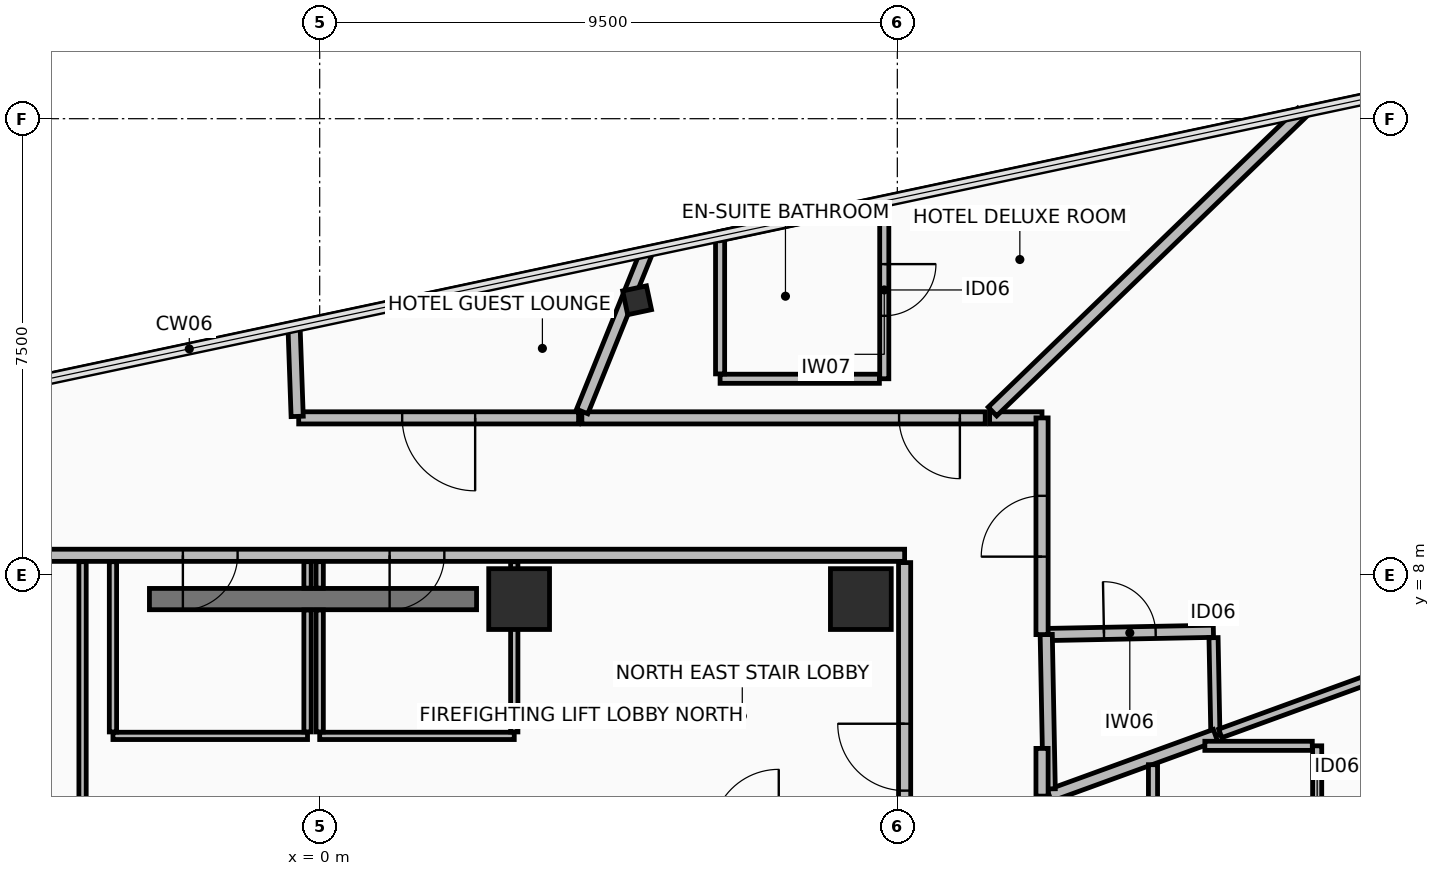
"""IFC4 building model, lengths in metres.
Left out: names, types, materials, properties, quantities, classifications, styles, units other than length and angle.
Written with IfcOpenShell. Run it as: python <this file> out.ifc"""

import sys

from ifc_helpers import new_model, si_unit, direction, frame, frame_2d, origin, origin_2d, place, context, subcontext, project, spatial, rectangle, hollow_rectangle, extrude, element, fill, save


model = new_model("IFC4")
c1 = context("Model", 3, precision=1e-05, world=origin(), true_north=direction((0.0, 1.0)))
c2 = subcontext(c1, "Body", "Model", "MODEL_VIEW")
j1 = project(units=[si_unit("LENGTHUNIT", "METRE"), si_unit("PLANEANGLEUNIT", "RADIAN")], contexts=[c1])
p1 = place(None, origin())
s1 = spatial("IfcSite", under=j1, at=p1, CompositionType="ELEMENT")
p2 = place(p1, origin())
s2 = spatial("IfcBuilding", under=s1, at=p2, CompositionType="ELEMENT")
p3 = place(p2, frame((0.0, 0.0, 294.35)))
s3 = spatial("IfcBuildingStorey", under=s2, at=p3, CompositionType="ELEMENT", Elevation=294.35)
for number, where, z_axis, x_axis in (
    (1, (8.9, 7.6, 0.0), (0.0, 0.0, 1.0), (1.0, 0.0, 0.0)),
    (2, (3.28, 7.6, 0.0), (0.0, 0.0, 1.0), (1.0, 0.0, 0.0)),
):
    element("IfcColumn", number, at=place(p3, frame(where, z_axis=z_axis, x_axis=x_axis)), inside=s3, PredefinedType="COLUMN", context=c2, shape_type="SweptSolid", body=[
        extrude(rectangle(XDim=1.0, YDim=1.0, at=origin_2d()), origin(), (0.0, 0.0, 1.0), 3.65),
    ])
p4 = place(p3, frame((5.22, 12.514, 0.0), z_axis=(0.0, 0.0, 1.0), x_axis=(0.978147237858, 0.207913398007, 0.0)))
e3 = element("IfcColumn", 3, at=p4, inside=s3, PredefinedType="COLUMN", context=c2, shape_type="SweptSolid", body=[
    extrude(hollow_rectangle(XDim=0.4, YDim=0.4, WallThickness=0.025, at=origin_2d()), origin(), (0.0, 0.0, 1.0), 3.65),
])
p5 = place(p3, frame((-2.8, 7.6, 0.0), z_axis=(0.0, 0.0, 1.0), x_axis=(1.0, 0.0, 0.0)))
e4 = element("IfcWall", 4, at=p5, inside=s3, PredefinedType="SHEAR", context=c2, shape_type="SweptSolid", body=[
    extrude(rectangle(XDim=5.38, YDim=0.35, at=frame_2d((2.69, 0.0))), origin(), (0.0, 0.0, 1.0), 3.45),
])
p6 = place(p3, frame((9.62, 8.32, 0.0), z_axis=(0.0, 0.0, 1.0), x_axis=(-1.0, 0.0, 0.0)))
e5 = element("IfcWall", 5, at=p6, inside=s3, PredefinedType="PARTITIONING", context=c2, shape_type="SweptSolid", body=[
    extrude(rectangle(XDim=19.24, YDim=0.2, at=frame_2d((9.62, 0.0))), origin(), (0.0, 0.0, 1.0), 2.945),
])
p7 = place(p6, frame((10.97, 0.0, 0.0)))
e6 = element("IfcOpeningElement", 6, at=p7, cuts=e5, PredefinedType="OPENING", context=c2, shape_type="SweptSolid", body=[
    extrude(rectangle(XDim=0.9, YDim=2.1, at=frame_2d((0.45, 1.05))), frame((0.0, 0.11, 0.0), z_axis=(0.0, -1.0, 0.0), x_axis=(1.0, 0.0, 0.0)), (0.0, 0.0, 1.0), 0.22),
])
p8 = place(p6, frame((7.57, 0.0, 0.0)))
e7 = element("IfcOpeningElement", 7, at=p8, cuts=e5, PredefinedType="OPENING", context=c2, shape_type="SweptSolid", body=[
    extrude(rectangle(XDim=0.9, YDim=2.1, at=frame_2d((0.45, 1.05))), frame((0.0, 0.11, 0.0), z_axis=(0.0, -1.0, 0.0), x_axis=(1.0, 0.0, 0.0)), (0.0, 0.0, 1.0), 0.22),
])
p9 = place(p6, frame((16.245, 0.0, 0.0)))
e8 = element("IfcOpeningElement", 8, at=p9, cuts=e5, PredefinedType="OPENING", context=c2, shape_type="SweptSolid", body=[
    extrude(rectangle(XDim=0.9, YDim=2.1, at=frame_2d((0.45, 1.05))), frame((0.0, 0.11, 0.0), z_axis=(0.0, -1.0, 0.0), x_axis=(1.0, 0.0, 0.0)), (0.0, 0.0, 1.0), 0.22),
])
p10 = place(p6, frame((14.295, 0.0, 0.0)))
e9 = element("IfcOpeningElement", 9, at=p10, cuts=e5, PredefinedType="OPENING", context=c2, shape_type="SweptSolid", body=[
    extrude(rectangle(XDim=0.9, YDim=2.1, at=frame_2d((0.45, 1.05))), frame((0.0, 0.11, 0.0), z_axis=(0.0, -1.0, 0.0), x_axis=(1.0, 0.0, 0.0)), (0.0, 0.0, 1.0), 0.22),
])
p11 = place(p3, frame((9.62, -8.2, 0.0), z_axis=(0.0, 0.0, 1.0), x_axis=(0.0, 1.0, 0.0)))
e10 = element("IfcWall", 10, at=p11, inside=s3, PredefinedType="PARTITIONING", context=c2, shape_type="SweptSolid", body=[
    extrude(rectangle(XDim=16.4, YDim=0.2, at=frame_2d((8.2, 0.0))), origin(), (0.0, 0.0, 1.0), 2.945),
])
p12 = place(p11, frame((12.65, 0.0, 0.0)))
e11 = element("IfcOpeningElement", 11, at=p12, cuts=e10, PredefinedType="OPENING", context=c2, shape_type="SweptSolid", body=[
    extrude(rectangle(XDim=1.1, YDim=2.15, at=frame_2d((0.55, 1.075))), frame((0.0, 0.11, 0.0), z_axis=(0.0, -1.0, 0.0), x_axis=(1.0, 0.0, 0.0)), (0.0, 0.0, 1.0), 0.22),
])
p13 = place(p3, frame((-3.4, 5.35, 0.0), z_axis=(0.0, 0.0, 1.0), x_axis=(1.0, 0.0, 0.0)))
e12 = element("IfcWall", 12, at=p13, inside=s3, PredefinedType="PARTITIONING", context=c2, shape_type="SweptSolid", body=[
    extrude(rectangle(XDim=3.2, YDim=0.12, at=frame_2d((1.6, 0.0))), origin(), (0.0, 0.0, 1.0), 3.45),
])
p14 = place(p3, frame((-0.2, 5.415, 0.0), z_axis=(0.0, 0.0, 1.0), x_axis=(0.0, 1.0, 0.0)))
e13 = element("IfcWall", 13, at=p14, inside=s3, PredefinedType="PARTITIONING", context=c2, shape_type="SweptSolid", body=[
    extrude(rectangle(XDim=2.005, YDim=0.12, at=frame_2d((1.002, 0.0))), origin(), (0.0, 0.0, 1.0), 2.745),
])
p15 = place(p3, frame((-0.2, 7.78, 0.0), z_axis=(0.0, 0.0, 1.0), x_axis=(0.0, 1.0, 0.0)))
e14 = element("IfcWall", 14, at=p15, inside=s3, PredefinedType="PARTITIONING", context=c2, shape_type="SweptSolid", body=[
    extrude(rectangle(XDim=0.435, YDim=0.12, at=frame_2d((0.218, 0.0))), origin(), (0.0, 0.0, 1.0), 2.745),
])
p16 = place(p3, frame((-3.4, 8.215, 0.0), z_axis=(0.0, 0.0, 1.0), x_axis=(0.0, -1.0, 0.0)))
e15 = element("IfcWall", 15, at=p16, inside=s3, PredefinedType="PARTITIONING", context=c2, shape_type="SweptSolid", body=[
    extrude(rectangle(XDim=2.8, YDim=0.12, at=frame_2d((1.4, 0.0))), origin(), (0.0, 0.0, 1.0), 2.745),
])
p17 = place(p3, frame((0.0, 5.35, 0.0), z_axis=(0.0, 0.0, 1.0), x_axis=(1.0, 0.0, 0.0)))
e16 = element("IfcWall", 16, at=p17, inside=s3, PredefinedType="PARTITIONING", context=c2, shape_type="SweptSolid", body=[
    extrude(rectangle(XDim=3.2, YDim=0.12, at=frame_2d((1.6, 0.0))), origin(), (0.0, 0.0, 1.0), 2.745),
])
p18 = place(p3, frame((3.2, 5.415, 0.0), z_axis=(0.0, 0.0, 1.0), x_axis=(0.0, 1.0, 0.0)))
e17 = element("IfcWall", 17, at=p18, inside=s3, PredefinedType="PARTITIONING", context=c2, shape_type="SweptSolid", body=[
    extrude(rectangle(XDim=2.8, YDim=0.12, at=frame_2d((1.4, 0.0))), origin(), (0.0, 0.0, 1.0), 2.745),
])
p19 = place(p3, frame((0.0, 8.215, 0.0), z_axis=(0.0, 0.0, 1.0), x_axis=(0.0, -1.0, 0.0)))
e18 = element("IfcWall", 18, at=p19, inside=s3, PredefinedType="PARTITIONING", context=c2, shape_type="SweptSolid", body=[
    extrude(rectangle(XDim=0.435, YDim=0.12, at=frame_2d((0.218, 0.0))), origin(), (0.0, 0.0, 1.0), 2.745),
])
p20 = place(p3, frame((0.0, 7.42, 0.0), z_axis=(0.0, 0.0, 1.0), x_axis=(0.0, -1.0, 0.0)))
e19 = element("IfcWall", 19, at=p20, inside=s3, PredefinedType="PARTITIONING", context=c2, shape_type="SweptSolid", body=[
    extrude(rectangle(XDim=2.005, YDim=0.12, at=frame_2d((1.002, 0.0))), origin(), (0.0, 0.0, 1.0), 2.745),
])
p21 = place(p3, frame((-3.9, 4.265, 0.0), z_axis=(0.0, 0.0, 1.0), x_axis=(0.0, 1.0, 0.0)))
e20 = element("IfcWall", 20, at=p21, inside=s3, PredefinedType="PARTITIONING", context=c2, shape_type="SweptSolid", body=[
    extrude(rectangle(XDim=3.95, YDim=0.12, at=frame_2d((1.975, 0.0))), origin(), (0.0, 0.0, 1.0), 2.745),
])
p22 = place(p3, frame((11.949, 7.017, 0.0), z_axis=(0.0, 0.0, 1.0), x_axis=(0.999812703389, 0.019353504647, 0.0)))
e21 = element("IfcWall", 21, at=p22, inside=s3, PredefinedType="PARTITIONING", context=c2, shape_type="SweptSolid", body=[
    extrude(rectangle(XDim=2.75, YDim=0.2, at=frame_2d((1.375, 0.0))), origin(), (0.0, 0.0, 1.0), 3.205),
])
p23 = place(p22, frame((0.95, 0.0, 0.0)))
e22 = element("IfcOpeningElement", 22, at=p23, cuts=e21, PredefinedType="OPENING", context=c2, shape_type="SweptSolid", body=[
    extrude(rectangle(XDim=0.85, YDim=2.1, at=frame_2d((0.425, 1.05))), frame((0.0, 0.11, 0.0), z_axis=(0.0, -1.0, 0.0), x_axis=(1.0, 0.0, 0.0)), (0.0, 0.0, 1.0), 0.22),
])
p24 = place(p3, frame((14.7, 6.965, 0.0), z_axis=(0.0, 0.0, 1.0), x_axis=(0.01933256163, -0.999813108566, 0.0)))
e23 = element("IfcWall", 23, at=p24, inside=s3, PredefinedType="PARTITIONING", context=c2, shape_type="SweptSolid", body=[
    extrude(rectangle(XDim=1.604, YDim=0.15, at=frame_2d((0.802, 0.0))), origin(), (0.0, 0.0, 1.0), 3.205),
])
p25 = place(p3, frame((14.731, 5.362, 0.0), z_axis=(0.0, 0.0, 1.0), x_axis=(-0.939685466816, -0.342039798058, 0.0)))
e24 = element("IfcWall", 24, at=p25, inside=s3, PredefinedType="PARTITIONING", context=c2, shape_type="SweptSolid", body=[
    extrude(rectangle(XDim=2.906, YDim=0.2, at=frame_2d((1.453, 0.0))), origin(), (0.0, 0.0, 1.0), 3.205),
])
p26 = place(p3, frame((11.998, 4.479, 0.0), z_axis=(0.0, 0.0, 1.0), x_axis=(-0.019327029844, 0.999813215514, 0.0)))
e25 = element("IfcWall", 25, at=p26, inside=s3, PredefinedType="PARTITIONING", context=c2, shape_type="SweptSolid", body=[
    extrude(rectangle(XDim=2.539, YDim=0.2, at=frame_2d((1.27, 0.0))), origin(), (0.0, 0.0, 1.0), 3.45),
])
p27 = place(p3, frame((9.285, 14.145, 0.0), z_axis=(0.0, 0.0, 1.0), x_axis=(0.0, -1.0, 0.0)))
e26 = element("IfcWall", 26, at=p27, inside=s3, PredefinedType="PARTITIONING", context=c2, shape_type="SweptSolid", body=[
    extrude(rectangle(XDim=2.922, YDim=0.15, at=frame_2d((1.461, 0.0))), origin(), (0.0, 0.0, 1.0), 2.795),
])
p28 = place(p27, frame((1.036, 0.0, 0.0)))
e27 = element("IfcOpeningElement", 27, at=p28, cuts=e26, PredefinedType="OPENING", context=c2, shape_type="SweptSolid", body=[
    extrude(rectangle(XDim=0.85, YDim=2.1, at=frame_2d((0.425, 1.05))), frame((0.0, 0.085, 0.0), z_axis=(0.0, -1.0, 0.0), x_axis=(1.0, 0.0, 0.0)), (0.0, 0.0, 1.0), 0.17),
])
p29 = place(p3, frame((9.205, 11.223, 0.0), z_axis=(0.0, 0.0, 1.0), x_axis=(-1.0, 0.0, 0.0)))
e28 = element("IfcWall", 28, at=p29, inside=s3, PredefinedType="PARTITIONING", context=c2, shape_type="SweptSolid", body=[
    extrude(rectangle(XDim=2.62, YDim=0.15, at=frame_2d((1.31, 0.0))), origin(), (0.0, 0.0, 1.0), 3.45),
])
p30 = place(p3, frame((6.585, 11.303, 0.0), z_axis=(0.0, 0.0, 1.0), x_axis=(0.0, 1.0, 0.0)))
e29 = element("IfcWall", 29, at=p30, inside=s3, PredefinedType="PARTITIONING", context=c2, shape_type="SweptSolid", body=[
    extrude(rectangle(XDim=2.268, YDim=0.15, at=frame_2d((1.134, 0.0))), origin(), (0.0, 0.0, 1.0), 2.795),
])
p31 = place(p3, frame((6.585, 13.571, 0.0), z_axis=(0.0, 0.0, 1.0), x_axis=(0.978119654151, 0.208043125732, 0.0)))
e30 = element("IfcWall", 30, at=p31, inside=s3, PredefinedType="PARTITIONING", context=c2, shape_type="SweptSolid", body=[
    extrude(rectangle(XDim=1.695, YDim=0.15, at=frame_2d((0.847, 0.0))), origin(), (0.0, 0.0, 1.0), 3.45),
])
p32 = place(p3, frame((8.243, 13.923, 0.0), z_axis=(0.0, 0.0, 1.0), x_axis=(1.0, 0.0, 0.0)))
e31 = element("IfcWall", 31, at=p32, inside=s3, PredefinedType="PARTITIONING", context=c2, shape_type="SweptSolid", body=[
    extrude(rectangle(XDim=0.962, YDim=0.15, at=frame_2d((0.481, 0.0))), origin(), (0.0, 0.0, 1.0), 3.45),
])
p33 = place(p3, frame((16.405, 5.187, 0.0), z_axis=(0.0, 0.0, 1.0), x_axis=(0.0, -1.0, 0.0)))
e32 = element("IfcWall", 32, at=p33, inside=s3, PredefinedType="PARTITIONING", context=c2, shape_type="SweptSolid", body=[
    extrude(rectangle(XDim=2.7, YDim=0.15, at=frame_2d((1.35, 0.0))), origin(), (0.0, 0.0, 1.0), 3.205),
])
p34 = place(p33, frame((0.925, 0.0, 0.0)))
e33 = element("IfcOpeningElement", 33, at=p34, cuts=e32, PredefinedType="OPENING", context=c2, shape_type="SweptSolid", body=[
    extrude(rectangle(XDim=0.85, YDim=2.1, at=frame_2d((0.425, 1.05))), frame((0.0, 0.085, 0.0), z_axis=(0.0, -1.0, 0.0), x_axis=(1.0, 0.0, 0.0)), (0.0, 0.0, 1.0), 0.17),
])
p35 = place(p3, frame((13.705, 2.567, 0.0), z_axis=(0.0, 0.0, 1.0), x_axis=(0.0, 1.0, 0.0)))
e34 = element("IfcWall", 34, at=p35, inside=s3, PredefinedType="PARTITIONING", context=c2, shape_type="SweptSolid", body=[
    extrude(rectangle(XDim=2.31, YDim=0.15, at=frame_2d((1.155, 0.0))), origin(), (0.0, 0.0, 1.0), 3.45),
])
p36 = place(p3, frame((14.558, 5.187, 0.0), z_axis=(0.0, 0.0, 1.0), x_axis=(1.0, 0.0, 0.0)))
e35 = element("IfcWall", 35, at=p36, inside=s3, PredefinedType="PARTITIONING", context=c2, shape_type="SweptSolid", body=[
    extrude(rectangle(XDim=1.767, YDim=0.15, at=frame_2d((0.884, 0.0))), origin(), (0.0, 0.0, 1.0), 3.205),
])
p37 = place(p3, frame((11.879, 10.58, 0.0), z_axis=(0.0, 0.0, 1.0), x_axis=(-1.0, 0.0, 0.0)))
e36 = element("IfcWall", 36, at=p37, inside=s3, PredefinedType="PARTITIONING", context=c2, shape_type="SweptSolid", body=[
    extrude(rectangle(XDim=0.862, YDim=0.2, at=frame_2d((0.431, 0.0))), origin(), (0.0, 0.0, 1.0), 3.45),
])
p38 = place(p3, frame((11.065, 10.685, 0.0), z_axis=(0.0, 0.0, 1.0), x_axis=(0.719349741171, 0.694648076278, 0.0)))
e37 = element("IfcWall", 37, at=p38, inside=s3, PredefinedType="PARTITIONING", context=c2, shape_type="SweptSolid", body=[
    extrude(rectangle(XDim=7.077, YDim=0.2, at=frame_2d((3.538, 0.0))), origin(), (0.0, 0.0, 1.0), 2.795),
])
p39 = place(p3, frame((21.553, 7.844, 0.0), z_axis=(0.0, 0.0, 1.0), x_axis=(-0.939693036583, -0.34201900093, 0.0)))
e38 = element("IfcWall", 38, at=p39, inside=s3, PredefinedType="PARTITIONING", context=c2, shape_type="SweptSolid", body=[
    extrude(rectangle(XDim=7.175, YDim=0.15, at=frame_2d((3.587, 0.0))), origin(), (0.0, 0.0, 1.0), 2.795),
])
p40 = place(p3, frame((11.88, 4.36, 0.0), z_axis=(0.0, 0.0, 1.0), x_axis=(0.0, 1.0, 0.0)))
e39 = element("IfcWall", 39, at=p40, inside=s3, PredefinedType="PARTITIONING", context=c2, shape_type="SweptSolid", body=[
    extrude(rectangle(XDim=0.785, YDim=0.2, at=frame_2d((0.393, 0.0))), origin(), (0.0, 0.0, 1.0), 3.45),
])
p41 = place(p3, frame((11.88, 7.016, 0.0), z_axis=(0.0, 0.0, 1.0), x_axis=(0.0, 1.0, 0.0)))
e40 = element("IfcWall", 40, at=p41, inside=s3, PredefinedType="PARTITIONING", context=c2, shape_type="SweptSolid", body=[
    extrude(rectangle(XDim=3.563, YDim=0.2, at=frame_2d((1.782, 0.0))), origin(), (0.0, 0.0, 1.0), 2.945),
])
p42 = place(p41, frame((1.282, 0.0, 0.0)))
e41 = element("IfcOpeningElement", 41, at=p42, cuts=e40, PredefinedType="OPENING", context=c2, shape_type="SweptSolid", body=[
    extrude(rectangle(XDim=1.0, YDim=2.15, at=frame_2d((0.5, 1.075))), frame((0.0, 0.11, 0.0), z_axis=(0.0, -1.0, 0.0), x_axis=(1.0, 0.0, 0.0)), (0.0, 0.0, 1.0), 0.22),
])
p43 = place(p3, frame((10.946, 10.58, 0.0), z_axis=(0.0, 0.0, 1.0), x_axis=(-1.0, 0.0, 0.0)))
e42 = element("IfcWall", 42, at=p43, inside=s3, PredefinedType="PARTITIONING", context=c2, shape_type="SweptSolid", body=[
    extrude(rectangle(XDim=6.634, YDim=0.2, at=frame_2d((3.317, 0.0))), origin(), (0.0, 0.0, 1.0), 2.945),
])
p44 = place(p43, frame((0.417, 0.0, 0.0)))
e43 = element("IfcOpeningElement", 43, at=p44, cuts=e42, PredefinedType="OPENING", context=c2, shape_type="SweptSolid", body=[
    extrude(rectangle(XDim=1.0, YDim=2.15, at=frame_2d((0.5, 1.075))), frame((0.0, 0.11, 0.0), z_axis=(0.0, -1.0, 0.0), x_axis=(1.0, 0.0, 0.0)), (0.0, 0.0, 1.0), 0.22),
])
p45 = place(p3, frame((4.317, 10.685, 0.0), z_axis=(0.0, 0.0, 1.0), x_axis=(0.374699009618, 0.92714651064, 0.0)))
e44 = element("IfcWall", 44, at=p45, inside=s3, PredefinedType="PARTITIONING", context=c2, shape_type="SweptSolid", body=[
    extrude(rectangle(XDim=2.823, YDim=0.2, at=frame_2d((1.411, 0.0))), origin(), (0.0, 0.0, 1.0), 2.795),
])
p46 = place(p3, frame((4.258, 10.58, 0.0), z_axis=(0.0, 0.0, 1.0), x_axis=(-1.0, 0.0, 0.0)))
e45 = element("IfcWall", 45, at=p46, inside=s3, PredefinedType="PARTITIONING", context=c2, shape_type="SweptSolid", body=[
    extrude(rectangle(XDim=4.603, YDim=0.2, at=frame_2d((2.302, 0.0))), origin(), (0.0, 0.0, 1.0), 2.945),
])
p47 = place(p46, frame((1.701, 0.0, 0.0)))
e46 = element("IfcOpeningElement", 46, at=p47, cuts=e45, PredefinedType="OPENING", context=c2, shape_type="SweptSolid", body=[
    extrude(rectangle(XDim=1.2, YDim=2.15, at=frame_2d((0.6, 1.075))), frame((0.0, 0.11, 0.0), z_axis=(0.0, -1.0, 0.0), x_axis=(1.0, 0.0, 0.0)), (0.0, 0.0, 1.0), 0.22),
])
p48 = place(p3, frame((-0.37, 10.604, 0.0), z_axis=(0.0, 0.0, 1.0), x_axis=(-0.034848895105, 0.999392592783, 0.0)))
e47 = element("IfcWall", 47, at=p48, inside=s3, PredefinedType="PARTITIONING", context=c2, shape_type="SweptSolid", body=[
    extrude(rectangle(XDim=1.457, YDim=0.2, at=frame_2d((0.729, 0.0))), origin(), (0.0, 0.0, 1.0), 2.795),
])
p49 = place(p12, frame((1.1, 0.0, 0.0), z_axis=(0.0, 0.0, 1.0), x_axis=(-1.0, 0.0, 0.0)))
e48 = element("IfcDoor", 48, at=p49, inside=s3, OperationType="SINGLE_SWING_LEFT", PredefinedType="DOOR", context=c2, shape_type="SweptSolid", body=[
    extrude(rectangle(XDim=1.1, YDim=2.15, at=frame_2d((0.55, 1.075))), frame((0.0, 0.025, 0.0), z_axis=(0.0, -1.0, 0.0), x_axis=(1.0, 0.0, 0.0)), (0.0, 0.0, 1.0), 0.05),
])
fill(e11, e48)
p50 = place(p7, frame((0.9, 0.0, 0.0), z_axis=(0.0, 0.0, 1.0), x_axis=(-1.0, 0.0, 0.0)))
e49 = element("IfcDoor", 49, at=p50, inside=s3, OperationType="SINGLE_SWING_LEFT", PredefinedType="DOOR", context=c2, shape_type="SweptSolid", body=[
    extrude(rectangle(XDim=0.9, YDim=2.1, at=frame_2d((0.45, 1.05))), frame((0.0, 0.025, 0.0), z_axis=(0.0, -1.0, 0.0), x_axis=(1.0, 0.0, 0.0)), (0.0, 0.0, 1.0), 0.05),
])
fill(e6, e49)
p51 = place(p8, frame((0.9, 0.0, 0.0), z_axis=(0.0, 0.0, 1.0), x_axis=(-1.0, 0.0, 0.0)))
e50 = element("IfcDoor", 50, at=p51, inside=s3, OperationType="SINGLE_SWING_LEFT", PredefinedType="DOOR", context=c2, shape_type="SweptSolid", body=[
    extrude(rectangle(XDim=0.9, YDim=2.1, at=frame_2d((0.45, 1.05))), frame((0.0, 0.025, 0.0), z_axis=(0.0, -1.0, 0.0), x_axis=(1.0, 0.0, 0.0)), (0.0, 0.0, 1.0), 0.05),
])
fill(e7, e50)
p52 = place(p23, origin())
e51 = element("IfcDoor", 51, at=p52, inside=s3, OperationType="SINGLE_SWING_RIGHT", PredefinedType="DOOR", context=c2, shape_type="SweptSolid", body=[
    extrude(rectangle(XDim=0.85, YDim=2.1, at=frame_2d((0.425, 1.05))), frame((0.0, 0.025, 0.0), z_axis=(0.0, -1.0, 0.0), x_axis=(1.0, 0.0, 0.0)), (0.0, 0.0, 1.0), 0.05),
])
fill(e22, e51)
p53 = place(p28, origin())
e52 = element("IfcDoor", 52, at=p53, inside=s3, OperationType="SINGLE_SWING_RIGHT", PredefinedType="DOOR", context=c2, shape_type="SweptSolid", body=[
    extrude(rectangle(XDim=0.85, YDim=2.1, at=frame_2d((0.425, 1.05))), frame((0.0, 0.025, 0.0), z_axis=(0.0, -1.0, 0.0), x_axis=(1.0, 0.0, 0.0)), (0.0, 0.0, 1.0), 0.05),
])
fill(e27, e52)
p54 = place(p42, origin())
e53 = element("IfcDoor", 53, at=p54, inside=s3, OperationType="SINGLE_SWING_LEFT", PredefinedType="DOOR", context=c2, shape_type="SweptSolid", body=[
    extrude(rectangle(XDim=1.0, YDim=2.15, at=frame_2d((0.5, 1.075))), frame((0.0, 0.025, 0.0), z_axis=(0.0, -1.0, 0.0), x_axis=(1.0, 0.0, 0.0)), (0.0, 0.0, 1.0), 0.05),
])
fill(e41, e53)
p55 = place(p44, origin())
e54 = element("IfcDoor", 54, at=p55, inside=s3, OperationType="SINGLE_SWING_LEFT", PredefinedType="DOOR", context=c2, shape_type="SweptSolid", body=[
    extrude(rectangle(XDim=1.0, YDim=2.15, at=frame_2d((0.5, 1.075))), frame((0.0, 0.025, 0.0), z_axis=(0.0, -1.0, 0.0), x_axis=(1.0, 0.0, 0.0)), (0.0, 0.0, 1.0), 0.05),
])
fill(e43, e54)
p56 = place(p47, origin())
e55 = element("IfcDoor", 55, at=p56, inside=s3, OperationType="SINGLE_SWING_LEFT", PredefinedType="DOOR", context=c2, shape_type="SweptSolid", body=[
    extrude(rectangle(XDim=1.2, YDim=2.15, at=frame_2d((0.6, 1.075))), frame((0.0, 0.025, 0.0), z_axis=(0.0, -1.0, 0.0), x_axis=(1.0, 0.0, 0.0)), (0.0, 0.0, 1.0), 0.05),
])
fill(e46, e55)
save(model, sys.argv[1])
